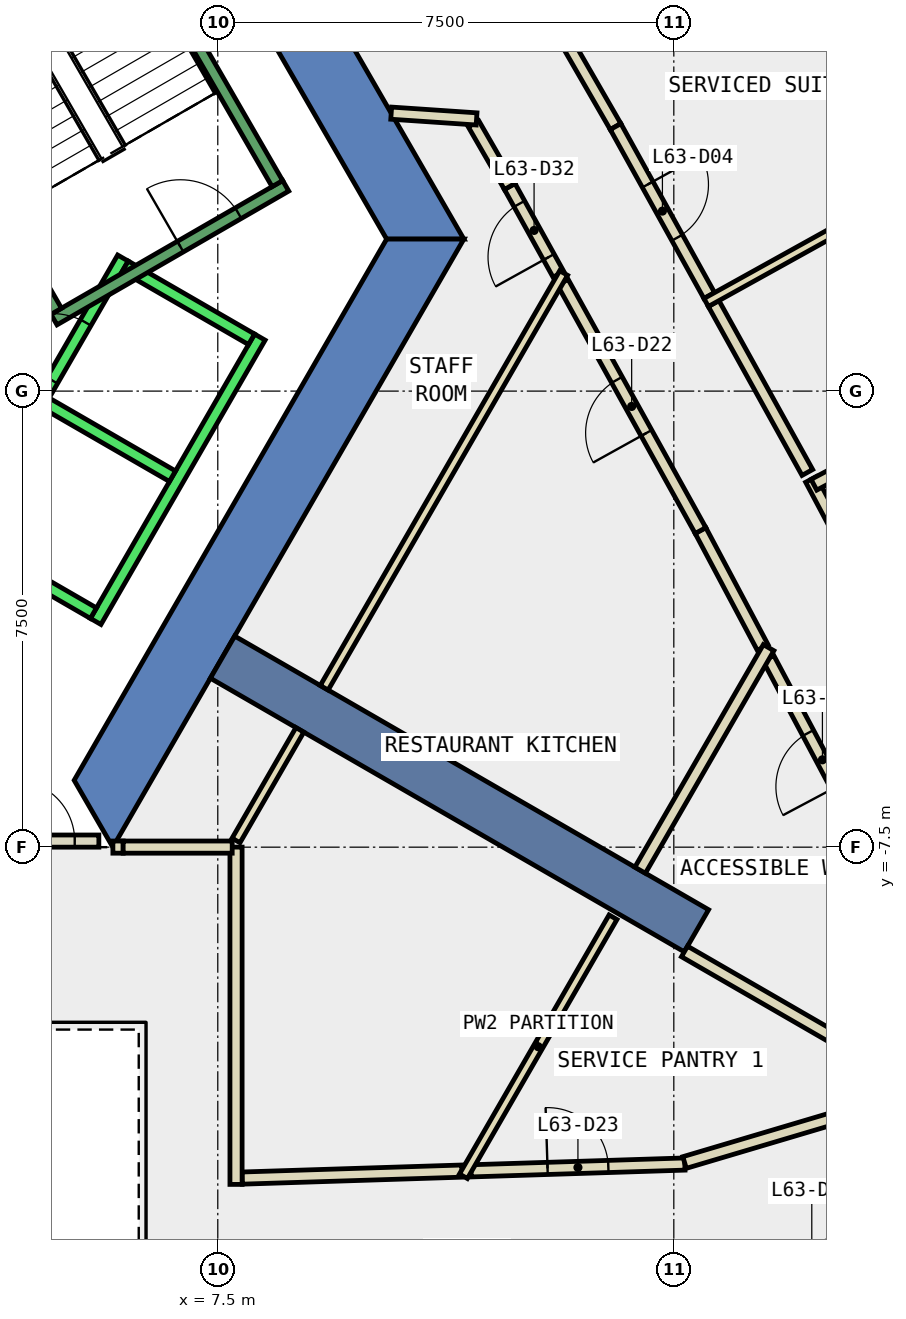
"""IFC4 building model, lengths in metres.
Left out: names, types, materials, properties, quantities, classifications, styles, units other than length and angle.
Written with IfcOpenShell. Run it as: python <this file> out.ifc"""

import sys

from ifc_helpers import new_model, si_unit, direction, frame, frame_2d, origin, place, context, subcontext, project, spatial, polyline, rectangle, outline, extrude, element, fill, save


model = new_model("IFC4")
c1 = context("Model", 3, precision=1e-05, world=origin(), true_north=direction((0.0, 1.0)))
c2 = subcontext(c1, "Body", "Model", "MODEL_VIEW")
j1 = project(units=[si_unit("LENGTHUNIT", "METRE"), si_unit("PLANEANGLEUNIT", "RADIAN")], contexts=[c1])
p1 = place(None, origin())
s1 = spatial("IfcSite", under=j1, at=p1, CompositionType="ELEMENT")
p2 = place(p1, origin())
s2 = spatial("IfcBuilding", under=s1, at=p2, CompositionType="ELEMENT")
p3 = place(p2, frame((0.0, 0.0, 273.8)))
s3 = spatial("IfcBuildingStorey", under=s2, at=p3, CompositionType="ELEMENT", Elevation=273.8)
p4 = place(p3, frame((0.0, 0.0, -0.34)))
e1 = element("IfcWall", 1, at=p4, inside=s3, PredefinedType="SHEAR", context=c2, shape_type="SweptSolid", body=[
    extrude(outline(polyline([(6.786, 10.747), (5.833, 10.197), (10.277, 2.5), (11.547, 2.5), (6.786, 10.747)])), origin(), (0.0, 0.0, 1.0), 3.6),
])
p5 = place(p3, frame((0.0, 0.0, -0.34)))
e2 = element("IfcWall", 2, at=p5, inside=s3, PredefinedType="SHEAR", context=c2, shape_type="SweptSolid", body=[
    extrude(outline(polyline([(5.774, -7.5), (11.547, 2.5), (10.277, 2.5), (5.138, -6.4), (5.774, -7.5)])), origin(), (0.0, 0.0, 1.0), 3.6),
])
p6 = place(p3, frame((7.578, -4.375, -0.34), z_axis=(0.0, 0.0, 1.0), x_axis=(0.866024315419, -0.5000018851, 0.0)))
e3 = element("IfcWall", 3, at=p6, inside=s3, PredefinedType="SHEAR", context=c2, shape_type="SweptSolid", body=[
    extrude(rectangle(XDim=9.0, YDim=0.8, at=frame_2d((4.5, 0.0))), origin(), (0.0, 0.0, 1.0), 3.6),
])
p7 = place(p3, frame((13.102, 1.921, 0.0), z_axis=(0.0, 0.0, 1.0), x_axis=(-0.485065409582, 0.874477871891, 0.0)))
e4 = element("IfcWall", 4, at=p7, inside=s3, PredefinedType="PARTITIONING", context=c2, shape_type="SweptSolid", body=[
    extrude(rectangle(XDim=1.651, YDim=0.2, at=frame_2d((0.826, 0.0))), origin(), (0.0, 0.0, 1.0), 3.26),
])
p8 = place(p7, frame((0.325, 0.0, 0.0)))
e5 = element("IfcOpeningElement", 5, at=p8, cuts=e4, PredefinedType="OPENING", context=c2, shape_type="SweptSolid", body=[
    extrude(rectangle(XDim=1.0, YDim=2.1, at=frame_2d((0.5, 1.05))), frame((0.0, 0.11, 0.0), z_axis=(0.0, -1.0, 0.0), x_axis=(1.0, 0.0, 0.0)), (0.0, 0.0, 1.0), 0.22),
])
p9 = place(p3, frame((12.301, 3.365, 0.0), z_axis=(0.0, 0.0, 1.0), x_axis=(-0.499823064078, 0.86612753369, 0.0)))
e6 = element("IfcWall", 6, at=p9, inside=s3, PredefinedType="PARTITIONING", context=c2, shape_type="SweptSolid", body=[
    extrude(rectangle(XDim=1.19, YDim=0.2, at=frame_2d((0.595, 0.0))), origin(), (0.0, 0.0, 1.0), 3.26),
])
p10 = place(p3, frame((11.756, 4.476, 0.0), z_axis=(0.0, 0.0, 1.0), x_axis=(-0.99772020739, 0.067486204256, 0.0)))
e7 = element("IfcWall", 7, at=p10, inside=s3, PredefinedType="PARTITIONING", context=c2, shape_type="SweptSolid", body=[
    extrude(rectangle(XDim=1.407, YDim=0.2, at=frame_2d((0.704, 0.0))), origin(), (0.0, 0.0, 1.0), 3.26),
])
p11 = place(p3, frame((7.9, -12.942, 0.0), z_axis=(0.0, 0.0, 1.0), x_axis=(0.999494468474, 0.031793198801, 0.0)))
e8 = element("IfcWall", 8, at=p11, inside=s3, PredefinedType="PARTITIONING", context=c2, shape_type="SweptSolid", body=[
    extrude(rectangle(XDim=3.617, YDim=0.2, at=frame_2d((1.808, 0.0))), origin(), (0.0, 0.0, 1.0), 3.26),
])
p12 = place(p3, frame((16.462, -4.217, 0.0), z_axis=(0.0, 0.0, 1.0), x_axis=(-0.469436447461, 0.882966263113, 0.0)))
e9 = element("IfcWall", 9, at=p12, inside=s3, PredefinedType="PARTITIONING", context=c2, shape_type="SweptSolid", body=[
    extrude(rectangle(XDim=2.179, YDim=0.2, at=frame_2d((1.09, 0.0))), origin(), (0.0, 0.0, 1.0), 3.26),
])
p13 = place(p3, frame((15.439, -2.293, 0.0), z_axis=(0.0, 0.0, 1.0), x_axis=(-0.485079003918, 0.874470331091, 0.0)))
e10 = element("IfcWall", 10, at=p13, inside=s3, PredefinedType="PARTITIONING", context=c2, shape_type="SweptSolid", body=[
    extrude(rectangle(XDim=4.669, YDim=0.2, at=frame_2d((2.334, 0.0))), origin(), (0.0, 0.0, 1.0), 3.26),
])
p14 = place(p13, frame((1.834, 0.0, 0.0)))
e11 = element("IfcOpeningElement", 11, at=p14, cuts=e10, PredefinedType="OPENING", context=c2, shape_type="SweptSolid", body=[
    extrude(rectangle(XDim=1.0, YDim=2.1, at=frame_2d((0.5, 1.05))), frame((0.0, 0.11, 0.0), z_axis=(0.0, -1.0, 0.0), x_axis=(1.0, 0.0, 0.0)), (0.0, 0.0, 1.0), 0.22),
])
p15 = place(p3, frame((11.665, -12.823, 0.0), z_axis=(0.0, 0.0, 1.0), x_axis=(0.99949244941, 0.03185660956, 0.0)))
e12 = element("IfcWall", 12, at=p15, inside=s3, PredefinedType="PARTITIONING", context=c2, shape_type="SweptSolid", body=[
    extrude(rectangle(XDim=3.518, YDim=0.2, at=frame_2d((1.759, 0.0))), origin(), (0.0, 0.0, 1.0), 3.26),
])
p16 = place(p15, frame((1.259, 0.0, 0.0)))
e13 = element("IfcOpeningElement", 13, at=p16, cuts=e12, PredefinedType="OPENING", context=c2, shape_type="SweptSolid", body=[
    extrude(rectangle(XDim=1.0, YDim=2.1, at=frame_2d((0.5, 1.05))), frame((0.0, 0.11, 0.0), z_axis=(0.0, -1.0, 0.0), x_axis=(1.0, 0.0, 0.0)), (0.0, 0.0, 1.0), 0.22),
])
p17 = place(p3, frame((15.177, -12.686, 0.0), z_axis=(0.0, 0.0, 1.0), x_axis=(0.958629704259, 0.284656090947, 0.0)))
e14 = element("IfcWall", 14, at=p17, inside=s3, PredefinedType="PARTITIONING", context=c2, shape_type="SweptSolid", body=[
    extrude(rectangle(XDim=2.972, YDim=0.2, at=frame_2d((1.486, 0.0))), origin(), (0.0, 0.0, 1.0), 3.26),
])
p18 = place(p3, frame((18.332, -7.733, 0.0), z_axis=(0.0, 0.0, 1.0), x_axis=(-0.469639737924, 0.882858152006, 0.0)))
e15 = element("IfcWall", 15, at=p18, inside=s3, PredefinedType="PARTITIONING", context=c2, shape_type="SweptSolid", body=[
    extrude(rectangle(XDim=3.782, YDim=0.2, at=frame_2d((1.891, 0.0))), origin(), (0.0, 0.0, 1.0), 3.26),
])
p19 = place(p18, frame((1.391, 0.0, 0.0)))
e16 = element("IfcOpeningElement", 16, at=p19, cuts=e15, PredefinedType="OPENING", context=c2, shape_type="SweptSolid", body=[
    extrude(rectangle(XDim=1.0, YDim=2.1, at=frame_2d((0.5, 1.05))), frame((0.0, 0.11, 0.0), z_axis=(0.0, -1.0, 0.0), x_axis=(1.0, 0.0, 0.0)), (0.0, 0.0, 1.0), 0.22),
])
p20 = place(p3, frame((19.04, -13.626, 0.0), z_axis=(0.0, 0.0, 1.0), x_axis=(-0.958734738219, -0.284302131073, 0.0)))
e17 = element("IfcWall", 17, at=p20, inside=s3, PredefinedType="PARTITIONING", context=c2, shape_type="SweptSolid", body=[
    extrude(rectangle(XDim=3.693, YDim=0.2, at=frame_2d((1.847, 0.0))), origin(), (0.0, 0.0, 1.0), 3.26),
])
p21 = place(p20, frame((0.947, 0.0, 0.0)))
e18 = element("IfcOpeningElement", 18, at=p21, cuts=e17, PredefinedType="OPENING", context=c2, shape_type="SweptSolid", body=[
    extrude(rectangle(XDim=1.8, YDim=2.1, at=frame_2d((0.9, 1.05))), frame((0.0, 0.11, 0.0), z_axis=(0.0, -1.0, 0.0), x_axis=(1.0, 0.0, 0.0)), (0.0, 0.0, 1.0), 0.22),
])
p22 = place(p3, frame((15.655, 1.44, 0.0), z_axis=(0.0, 0.0, 1.0), x_axis=(0.485107756493, -0.87445438108, 0.0)))
e19 = element("IfcWall", 19, at=p22, inside=s3, PredefinedType="PARTITIONING", context=c2, shape_type="SweptSolid", body=[
    extrude(rectangle(XDim=3.177, YDim=0.2, at=frame_2d((1.588, 0.0))), origin(), (0.0, 0.0, 1.0), 3.26),
])
p23 = place(p3, frame((17.257, -1.452, 0.0), z_axis=(0.0, 0.0, 1.0), x_axis=(0.469561695117, -0.882899662747, 0.0)))
e20 = element("IfcWall", 20, at=p23, inside=s3, PredefinedType="PARTITIONING", context=c2, shape_type="SweptSolid", body=[
    extrude(rectangle(XDim=3.0, YDim=0.2, at=frame_2d((1.5, 0.0))), origin(), (0.0, 0.0, 1.0), 3.26),
])
p24 = place(p3, frame((12.492, 7.035, 0.0), z_axis=(0.0, 0.0, 1.0), x_axis=(0.49999285859, -0.86602952684, 0.0)))
e21 = element("IfcWall", 21, at=p24, inside=s3, PredefinedType="PARTITIONING", context=c2, shape_type="SweptSolid", body=[
    extrude(rectangle(XDim=3.1, YDim=0.2, at=frame_2d((1.55, 0.0))), origin(), (0.0, 0.0, 1.0), 3.26),
])
p25 = place(p3, frame((14.042, 4.35, 0.0), z_axis=(0.0, 0.0, 1.0), x_axis=(0.484944791944, -0.874544766588, 0.0)))
e22 = element("IfcWall", 22, at=p25, inside=s3, PredefinedType="PARTITIONING", context=c2, shape_type="SweptSolid", body=[
    extrude(rectangle(XDim=3.178, YDim=0.2, at=frame_2d((1.589, 0.0))), origin(), (0.0, 0.0, 1.0), 3.26),
])
p26 = place(p25, frame((1.089, 0.0, 0.0)))
e23 = element("IfcOpeningElement", 23, at=p26, cuts=e22, PredefinedType="OPENING", context=c2, shape_type="SweptSolid", body=[
    extrude(rectangle(XDim=1.0, YDim=2.1, at=frame_2d((0.5, 1.05))), frame((0.0, 0.11, 0.0), z_axis=(0.0, -1.0, 0.0), x_axis=(1.0, 0.0, 0.0)), (0.0, 0.0, 1.0), 0.22),
])
p27 = place(p3, frame((5.775, -7.499, 0.0), z_axis=(0.0, 0.0, 1.0), x_axis=(1.0, 0.0, 0.0)))
e24 = element("IfcWall", 24, at=p27, inside=s3, PredefinedType="PARTITIONING", context=c2, shape_type="SweptSolid", body=[
    extrude(rectangle(XDim=0.169, YDim=0.2, at=frame_2d((0.084, 0.0))), origin(), (0.0, 0.0, 1.0), 2.4),
])
p28 = place(p3, frame((7.8, -7.39, 0.0), z_axis=(0.0, 0.0, 1.0), x_axis=(0.499977374825, 0.866038466041, 0.0)))
e25 = element("IfcWall", 25, at=p28, inside=s3, PredefinedType="PARTITIONING", context=c2, shape_type="SweptSolid", body=[
    extrude(rectangle(XDim=2.1, YDim=0.15, at=frame_2d((1.05, 0.0))), origin(), (0.0, 0.0, 1.0), 3.26),
])
p29 = place(p3, frame((7.8, -7.499, 0.0), z_axis=(0.0, 0.0, 1.0), x_axis=(0.0, -1.0, 0.0)))
e26 = element("IfcWall", 26, at=p29, inside=s3, PredefinedType="PARTITIONING", context=c2, shape_type="SweptSolid", body=[
    extrude(rectangle(XDim=5.547, YDim=0.2, at=frame_2d((2.773, 0.0))), origin(), (0.0, 0.0, 1.0), 3.26),
])
p30 = place(p3, frame((14.0, -8.652, 0.0), z_axis=(0.0, 0.0, 1.0), x_axis=(-0.500067562424, -0.865986393087, 0.0)))
e27 = element("IfcWall", 27, at=p30, inside=s3, PredefinedType="PARTITIONING", context=c2, shape_type="SweptSolid", body=[
    extrude(rectangle(XDim=4.919, YDim=0.15, at=frame_2d((2.459, 0.0))), origin(), (0.0, 0.0, 1.0), 3.26),
])
p31 = place(p3, frame((16.559, -4.219, 0.0), z_axis=(0.0, 0.0, 1.0), x_axis=(-0.499997491977, -0.866026851788, 0.0)))
e28 = element("IfcWall", 28, at=p31, inside=s3, PredefinedType="PARTITIONING", context=c2, shape_type="SweptSolid", body=[
    extrude(rectangle(XDim=4.226, YDim=0.2, at=frame_2d((2.113, 0.0))), origin(), (0.0, 0.0, 1.0), 3.26),
])
p32 = place(p3, frame((15.176, -9.215, 0.0), z_axis=(0.0, 0.0, 1.0), x_axis=(0.866006068523, -0.500033488159, 0.0)))
e29 = element("IfcWall", 29, at=p32, inside=s3, PredefinedType="PARTITIONING", context=c2, shape_type="SweptSolid", body=[
    extrude(rectangle(XDim=4.099, YDim=0.2, at=frame_2d((2.05, 0.0))), origin(), (0.0, 0.0, 1.0), 3.26),
])
p33 = place(p3, frame((19.511, -0.367, 0.0), z_axis=(0.0, 0.0, 1.0), x_axis=(-0.883014523832, -0.46934566228, 0.0)))
e30 = element("IfcWall", 30, at=p33, inside=s3, PredefinedType="PARTITIONING", context=c2, shape_type="SweptSolid", body=[
    extrude(rectangle(XDim=2.5, YDim=0.2, at=frame_2d((1.25, 0.0))), origin(), (0.0, 0.0, 1.0), 3.26),
])
p34 = place(p3, frame((15.532, 1.457, 0.0), z_axis=(0.0, 0.0, 1.0), x_axis=(0.874467143452, 0.485084750351, 0.0)))
e31 = element("IfcWall", 31, at=p34, inside=s3, PredefinedType="PARTITIONING", context=c2, shape_type="SweptSolid", body=[
    extrude(rectangle(XDim=6.5, YDim=0.15, at=frame_2d((3.25, 0.0))), origin(), (0.0, 0.0, 1.0), 3.26),
])
p35 = place(p3, frame((3.75, -7.4, 0.0), z_axis=(0.0, 0.0, 1.0), x_axis=(1.0, 0.0, 0.0)))
e32 = element("IfcWall", 32, at=p35, inside=s3, PredefinedType="PARTITIONING", context=c2, shape_type="SweptSolid", body=[
    extrude(rectangle(XDim=1.794, YDim=0.2, at=frame_2d((0.897, 0.0))), origin(), (0.0, 0.0, 1.0), 2.4),
])
p36 = place(p35, frame((0.397, 0.0, 0.0)))
e33 = element("IfcOpeningElement", 33, at=p36, cuts=e32, PredefinedType="OPENING", context=c2, shape_type="SweptSolid", body=[
    extrude(rectangle(XDim=1.0, YDim=2.1, at=frame_2d((0.5, 1.05))), frame((0.0, 0.11, 0.0), z_axis=(0.0, -1.0, 0.0), x_axis=(1.0, 0.0, 0.0)), (0.0, 0.0, 1.0), 0.22),
])
p37 = place(p3, frame((9.25, -4.879, 0.0), z_axis=(0.0, 0.0, 1.0), x_axis=(0.499999725187, 0.866025562448, 0.0)))
e34 = element("IfcWall", 34, at=p37, inside=s3, PredefinedType="PARTITIONING", context=c2, shape_type="SweptSolid", body=[
    extrude(rectangle(XDim=7.876, YDim=0.15, at=frame_2d((3.938, 0.0))), origin(), (0.0, 0.0, 1.0), 3.26),
])
p38 = place(p3, frame((5.944, -7.499, 0.0), z_axis=(0.0, 0.0, 1.0), x_axis=(1.0, 0.0, 0.0)))
e35 = element("IfcWall", 35, at=p38, inside=s3, PredefinedType="PARTITIONING", context=c2, shape_type="SweptSolid", body=[
    extrude(rectangle(XDim=1.793, YDim=0.2, at=frame_2d((0.896, 0.0))), origin(), (0.0, 0.0, 1.0), 3.26),
])
p39 = place(p3, frame((3.24, -2.488, 0.0), z_axis=(0.0, 0.0, 1.0), x_axis=(0.500034260056, 0.866005622828, 0.0)))
e36 = element("IfcWall", 36, at=p39, inside=s3, PredefinedType="STANDARD", context=c2, shape_type="SweptSolid", body=[
    extrude(rectangle(XDim=5.399, YDim=0.2, at=frame_2d((2.7, 0.0))), origin(), (0.0, 0.0, 1.0), 3.26),
])
p40 = place(p39, frame((3.075, 0.0, 0.0)))
e37 = element("IfcOpeningElement", 37, at=p40, cuts=e36, PredefinedType="OPENING", context=c2, shape_type="SweptSolid", body=[
    extrude(rectangle(XDim=1.1, YDim=2.1, at=frame_2d((0.55, 1.05))), frame((0.0, 0.11, 0.0), z_axis=(0.0, -1.0, 0.0), x_axis=(1.0, 0.0, 0.0)), (0.0, 0.0, 1.0), 0.22),
])
p41 = place(p39, frame((1.225, 0.0, 0.0)))
e38 = element("IfcOpeningElement", 38, at=p41, cuts=e36, PredefinedType="OPENING", context=c2, shape_type="SweptSolid", body=[
    extrude(rectangle(XDim=1.1, YDim=2.1, at=frame_2d((0.55, 1.05))), frame((0.0, 0.11, 0.0), z_axis=(0.0, -1.0, 0.0), x_axis=(1.0, 0.0, 0.0)), (0.0, 0.0, 1.0), 0.22),
])
p42 = place(p3, frame((5.492, -3.788, 0.0), z_axis=(0.0, 0.0, 1.0), x_axis=(0.500034260056, 0.866005622828, 0.0)))
e39 = element("IfcWall", 39, at=p42, inside=s3, PredefinedType="STANDARD", context=c2, shape_type="SweptSolid", body=[
    extrude(rectangle(XDim=5.399, YDim=0.2, at=frame_2d((2.7, 0.0))), origin(), (0.0, 0.0, 1.0), 3.26),
])
p43 = place(p3, frame((3.377, -2.452, 0.0), z_axis=(0.0, 0.0, 1.0), x_axis=(0.865955154139, -0.50012165622, 0.0)))
e40 = element("IfcWall", 40, at=p43, inside=s3, PredefinedType="STANDARD", context=c2, shape_type="SweptSolid", body=[
    extrude(rectangle(XDim=2.4, YDim=0.2, at=frame_2d((1.2, 0.0))), origin(), (0.0, 0.0, 1.0), 3.26),
])
for number, where, z_axis, x_axis in (
    (41, (4.677, -0.2, 0.0), (0.0, 0.0, 1.0), (0.866, -0.5, 0.0)),
    (42, (5.977, 2.052, 0.0), (0.0, 0.0, 1.0), (0.866, -0.5, 0.0)),
):
    element("IfcWall", number, at=place(p3, frame(where, z_axis=z_axis, x_axis=x_axis)), inside=s3, PredefinedType="STANDARD", context=c2, shape_type="SweptSolid", body=[
        extrude(rectangle(XDim=2.399, YDim=0.2, at=frame_2d((1.2, 0.0))), origin(), (0.0, 0.0, 1.0), 3.26),
    ])
p44 = place(p3, frame((4.806, 1.176, 0.0), z_axis=(0.0, 0.0, 1.0), x_axis=(0.866059941101, 0.499940174841, 0.0)))
e43 = element("IfcWall", 43, at=p44, inside=s3, PredefinedType="STANDARD", context=c2, shape_type="SweptSolid", body=[
    extrude(rectangle(XDim=4.4, YDim=0.2, at=frame_2d((2.2, 0.0))), origin(), (0.0, 0.0, 1.0), 3.26),
])
p45 = place(p44, frame((2.4, 0.0, 0.0)))
e44 = element("IfcOpeningElement", 44, at=p45, cuts=e43, PredefinedType="OPENING", context=c2, shape_type="SweptSolid", body=[
    extrude(rectangle(XDim=1.1, YDim=2.2, at=frame_2d((0.55, 1.1))), frame((0.0, 0.11, 0.0), z_axis=(0.0, -1.0, 0.0), x_axis=(1.0, 0.0, 0.0)), (0.0, 0.0, 1.0), 0.22),
])
p46 = place(p3, frame((4.843, 1.312, 0.0), z_axis=(0.0, 0.0, 1.0), x_axis=(-0.499963383562, 0.866046543262, 0.0)))
e45 = element("IfcWall", 45, at=p46, inside=s3, PredefinedType="STANDARD", context=c2, shape_type="SweptSolid", body=[
    extrude(rectangle(XDim=6.9, YDim=0.2, at=frame_2d((3.45, 0.0))), origin(), (0.0, 0.0, 1.0), 3.26),
])
p47 = place(p46, frame((0.45, 0.0, 0.0)))
e46 = element("IfcOpeningElement", 46, at=p47, cuts=e45, PredefinedType="OPENING", context=c2, shape_type="SweptSolid", body=[
    extrude(rectangle(XDim=1.1, YDim=2.2, at=frame_2d((0.55, 1.1))), frame((0.0, 0.11, 0.0), z_axis=(0.0, -1.0, 0.0), x_axis=(1.0, 0.0, 0.0)), (0.0, 0.0, 1.0), 0.22),
])
p48 = place(p3, frame((8.48, 3.412, 0.0), z_axis=(0.0, 0.0, 1.0), x_axis=(-0.499978703459, 0.866037698999, 0.0)))
e47 = element("IfcWall", 47, at=p48, inside=s3, PredefinedType="STANDARD", context=c2, shape_type="SweptSolid", body=[
    extrude(rectangle(XDim=6.9, YDim=0.2, at=frame_2d((3.45, 0.0))), origin(), (0.0, 0.0, 1.0), 3.26),
])
p49 = place(p26, origin())
e48 = element("IfcDoor", 48, at=p49, inside=s3, OperationType="SINGLE_SWING_LEFT", PredefinedType="DOOR", context=c2, shape_type="SweptSolid", body=[
    extrude(rectangle(XDim=1.0, YDim=2.1, at=frame_2d((0.5, 1.05))), frame((0.0, 0.025, 0.0), z_axis=(0.0, -1.0, 0.0), x_axis=(1.0, 0.0, 0.0)), (0.0, 0.0, 1.0), 0.05),
])
fill(e23, e48)
p50 = place(p21, origin())
e49 = element("IfcDoor", 49, at=p50, inside=s3, OperationType="DOUBLE_DOOR_SINGLE_SWING", PredefinedType="DOOR", context=c2, shape_type="SweptSolid", body=[
    extrude(rectangle(XDim=1.8, YDim=2.1, at=frame_2d((0.9, 1.05))), frame((0.0, 0.025, 0.0), z_axis=(0.0, -1.0, 0.0), x_axis=(1.0, 0.0, 0.0)), (0.0, 0.0, 1.0), 0.05),
])
fill(e18, e49)
p51 = place(p14, origin())
e50 = element("IfcDoor", 50, at=p51, inside=s3, OperationType="SINGLE_SWING_LEFT", PredefinedType="DOOR", context=c2, shape_type="SweptSolid", body=[
    extrude(rectangle(XDim=1.0, YDim=2.1, at=frame_2d((0.5, 1.05))), frame((0.0, 0.025, 0.0), z_axis=(0.0, -1.0, 0.0), x_axis=(1.0, 0.0, 0.0)), (0.0, 0.0, 1.0), 0.05),
])
fill(e11, e50)
p52 = place(p16, origin())
e51 = element("IfcDoor", 51, at=p52, inside=s3, OperationType="SINGLE_SWING_RIGHT", PredefinedType="DOOR", context=c2, shape_type="SweptSolid", body=[
    extrude(rectangle(XDim=1.0, YDim=2.1, at=frame_2d((0.5, 1.05))), frame((0.0, 0.025, 0.0), z_axis=(0.0, -1.0, 0.0), x_axis=(1.0, 0.0, 0.0)), (0.0, 0.0, 1.0), 0.05),
])
fill(e13, e51)
p53 = place(p19, origin())
e52 = element("IfcDoor", 52, at=p53, inside=s3, OperationType="SINGLE_SWING_RIGHT", PredefinedType="DOOR", context=c2, shape_type="SweptSolid", body=[
    extrude(rectangle(XDim=1.0, YDim=2.1, at=frame_2d((0.5, 1.05))), frame((0.0, 0.025, 0.0), z_axis=(0.0, -1.0, 0.0), x_axis=(1.0, 0.0, 0.0)), (0.0, 0.0, 1.0), 0.05),
])
fill(e16, e52)
p54 = place(p8, origin())
e53 = element("IfcDoor", 53, at=p54, inside=s3, OperationType="SINGLE_SWING_RIGHT", PredefinedType="DOOR", context=c2, shape_type="SweptSolid", body=[
    extrude(rectangle(XDim=1.0, YDim=2.1, at=frame_2d((0.5, 1.05))), frame((0.0, 0.025, 0.0), z_axis=(0.0, -1.0, 0.0), x_axis=(1.0, 0.0, 0.0)), (0.0, 0.0, 1.0), 0.05),
])
fill(e5, e53)
p55 = place(p36, origin())
e54 = element("IfcDoor", 54, at=p55, inside=s3, OperationType="SINGLE_SWING_LEFT", PredefinedType="DOOR", context=c2, shape_type="SweptSolid", body=[
    extrude(rectangle(XDim=1.0, YDim=2.1, at=frame_2d((0.5, 1.05))), frame((0.0, 0.025, 0.0), z_axis=(0.0, -1.0, 0.0), x_axis=(1.0, 0.0, 0.0)), (0.0, 0.0, 1.0), 0.05),
])
fill(e33, e54)
p56 = place(p40, origin())
e55 = element("IfcDoor", 55, at=p56, inside=s3, OperationType="SLIDING_TO_LEFT", PredefinedType="DOOR", context=c2, shape_type="SweptSolid", body=[
    extrude(rectangle(XDim=1.1, YDim=2.1, at=frame_2d((0.55, 1.05))), frame((0.0, 0.025, 0.0), z_axis=(0.0, -1.0, 0.0), x_axis=(1.0, 0.0, 0.0)), (0.0, 0.0, 1.0), 0.05),
])
fill(e37, e55)
p57 = place(p45, origin())
e56 = element("IfcDoor", 56, at=p57, inside=s3, OperationType="SINGLE_SWING_LEFT", PredefinedType="DOOR", context=c2, shape_type="SweptSolid", body=[
    extrude(rectangle(XDim=1.1, YDim=2.2, at=frame_2d((0.55, 1.1))), frame((0.0, 0.025, 0.0), z_axis=(0.0, -1.0, 0.0), x_axis=(1.0, 0.0, 0.0)), (0.0, 0.0, 1.0), 0.05),
])
fill(e44, e56)
save(model, sys.argv[1])
